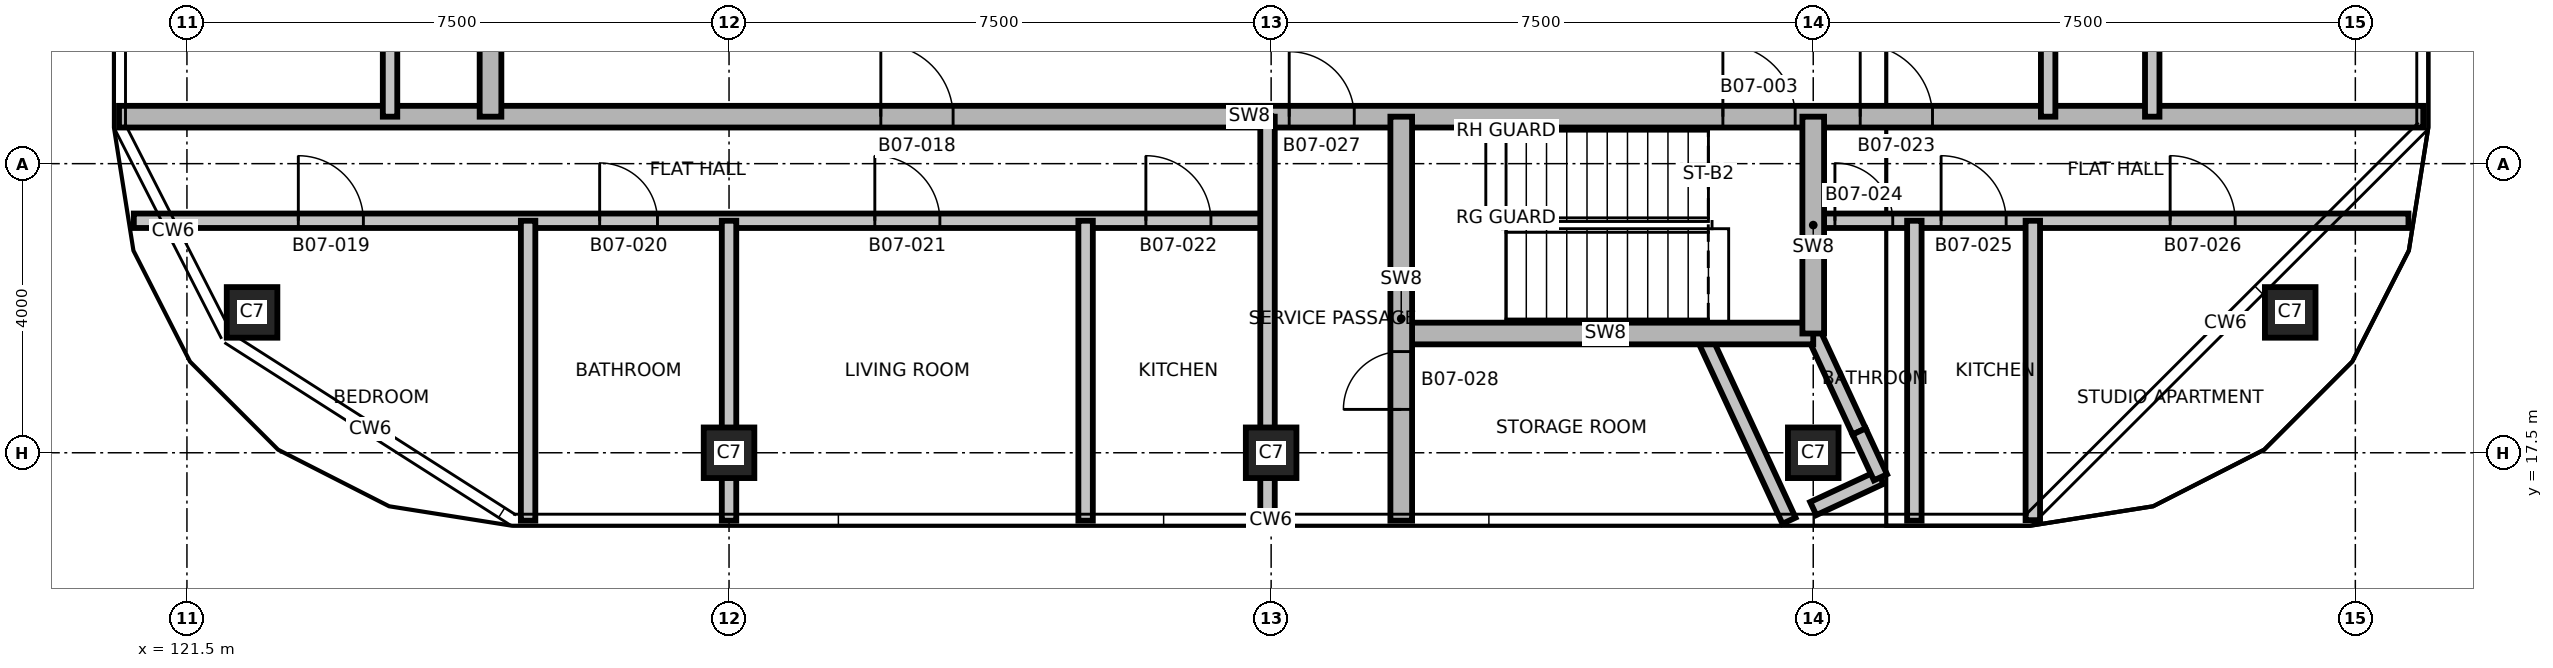
"""IFC4 building model, lengths in metres.
Left out: names, types, materials, properties, quantities, classifications, styles, units other than length and angle.
Written with IfcOpenShell. Run it as: python <this file> out.ifc"""

import sys

from ifc_helpers import new_model, si_unit, direction, frame, frame_2d, origin, origin_2d, place, context, subcontext, project, spatial, rectangle, extrude, element, fill, save


model = new_model("IFC4")
c1 = context("Model", 3, precision=1e-05, world=origin(), true_north=direction((0.0, 1.0)))
c2 = subcontext(c1, "Body", "Model", "MODEL_VIEW")
j1 = project(units=[si_unit("LENGTHUNIT", "METRE"), si_unit("PLANEANGLEUNIT", "RADIAN")], contexts=[c1])
p1 = place(None, origin())
s1 = spatial("IfcSite", under=j1, at=p1, CompositionType="ELEMENT")
p2 = place(p1, origin())
s2 = spatial("IfcBuilding", under=s1, at=p2, CompositionType="ELEMENT")
p3 = place(p2, frame((0.0, 0.0, 90.8)))
s3 = spatial("IfcBuildingStorey", under=s2, at=p3, CompositionType="ELEMENT", Elevation=90.8)
for number, where, z_axis, x_axis in (
    (1, (129.0, 17.5, 0.0), (0.0, 0.0, 1.0), (1.0, 0.0, 0.0)),
    (2, (136.5, 17.5, 0.0), (0.0, 0.0, 1.0), (1.0, 0.0, 0.0)),
    (3, (144.0, 17.5, 0.0), (0.0, 0.0, 1.0), (1.0, 0.0, 0.0)),
    (4, (122.401, 19.442, 0.0), (0.0, 0.0, 1.0), (1.0, 0.0, 0.0)),
    (5, (150.599, 19.442, 0.0), (0.0, 0.0, 1.0), (1.0, 0.0, 0.0)),
):
    element("IfcColumn", number, at=place(p3, frame(where, z_axis=z_axis, x_axis=x_axis)), inside=s3, PredefinedType="COLUMN", context=c2, shape_type="SweptSolid", body=[
        extrude(rectangle(XDim=0.7, YDim=0.7, at=origin_2d()), origin(), (0.0, 0.0, 1.0), 3.7),
    ])
p4 = place(p3, frame((142.463, 19.15, 0.0), z_axis=(0.0, 0.0, 1.0), x_axis=(0.421030913131, -0.90704628889, 0.0)))
e6 = element("IfcWall", 6, at=p4, inside=s3, PredefinedType="PARTITIONING", context=c2, shape_type="SweptSolid", body=[
    extrude(rectangle(XDim=2.855, YDim=0.2, at=frame_2d((1.428, 0.0))), origin(), (0.0, 0.0, 1.0), 3.4),
])
p5 = place(p3, frame((144.0, 16.728, 0.0), z_axis=(0.0, 0.0, 1.0), x_axis=(0.906960240365, 0.42121624185, 0.0)))
e7 = element("IfcWall", 7, at=p5, inside=s3, PredefinedType="PARTITIONING", context=c2, shape_type="SweptSolid", body=[
    extrude(rectangle(XDim=1.025, YDim=0.2, at=frame_2d((0.513, 0.0))), origin(), (0.0, 0.0, 1.0), 3.4),
])
p6 = place(p3, frame((144.0, 19.163, 0.0), z_axis=(0.0, 0.0, 1.0), x_axis=(0.420997169079, -0.907061951372, 0.0)))
e8 = element("IfcWall", 8, at=p6, inside=s3, PredefinedType="PARTITIONING", context=c2, shape_type="SweptSolid", body=[
    extrude(rectangle(XDim=1.508, YDim=0.2, at=frame_2d((0.754, 0.0))), origin(), (0.0, 0.0, 1.0), 3.4),
])
p7 = place(p3, frame((144.635, 17.795, 0.0), z_axis=(0.0, 0.0, 1.0), x_axis=(0.421223998033, -0.906956638148, 0.0)))
e9 = element("IfcWall", 9, at=p7, inside=s3, PredefinedType="PARTITIONING", context=c2, shape_type="SweptSolid", body=[
    extrude(rectangle(XDim=0.7, YDim=0.2, at=frame_2d((0.35, 0.0))), origin(), (0.0, 0.0, 1.0), 3.4),
])
p8 = place(p3, frame((138.25, 19.15, 0.0), z_axis=(0.0, 0.0, 1.0), x_axis=(1.0, 0.0, 0.0)))
e10 = element("IfcWall", 10, at=p8, inside=s3, PredefinedType="SHEAR", context=c2, shape_type="SweptSolid", body=[
    extrude(rectangle(XDim=5.75, YDim=0.3, at=frame_2d((2.875, 0.0))), origin(), (0.0, 0.0, 1.0), 3.4),
])
p9 = place(p3, frame((120.765, 20.71, 0.0), z_axis=(0.0, 0.0, 1.0), x_axis=(1.0, 0.0, 0.0)))
e11 = element("IfcWall", 11, at=p9, inside=s3, PredefinedType="PARTITIONING", context=c2, shape_type="SweptSolid", body=[
    extrude(rectangle(XDim=15.735, YDim=0.2, at=frame_2d((7.868, 0.0))), origin(), (0.0, 0.0, 1.0), 3.4),
])
p10 = place(p9, frame((2.276, 0.0, 0.0)))
e12 = element("IfcOpeningElement", 12, at=p10, cuts=e11, PredefinedType="OPENING", context=c2, shape_type="SweptSolid", body=[
    extrude(rectangle(XDim=0.9, YDim=2.1, at=frame_2d((0.45, 1.05))), frame((0.0, 0.11, 0.0), z_axis=(0.0, -1.0, 0.0), x_axis=(1.0, 0.0, 0.0)), (0.0, 0.0, 1.0), 0.22),
])
p11 = place(p9, frame((6.445, 0.0, 0.0)))
e13 = element("IfcOpeningElement", 13, at=p11, cuts=e11, PredefinedType="OPENING", context=c2, shape_type="SweptSolid", body=[
    extrude(rectangle(XDim=0.8, YDim=2.1, at=frame_2d((0.4, 1.05))), frame((0.0, 0.11, 0.0), z_axis=(0.0, -1.0, 0.0), x_axis=(1.0, 0.0, 0.0)), (0.0, 0.0, 1.0), 0.22),
])
p12 = place(p9, frame((10.252, 0.0, 0.0)))
e14 = element("IfcOpeningElement", 14, at=p12, cuts=e11, PredefinedType="OPENING", context=c2, shape_type="SweptSolid", body=[
    extrude(rectangle(XDim=0.9, YDim=2.1, at=frame_2d((0.45, 1.05))), frame((0.0, 0.11, 0.0), z_axis=(0.0, -1.0, 0.0), x_axis=(1.0, 0.0, 0.0)), (0.0, 0.0, 1.0), 0.22),
])
p13 = place(p9, frame((14.002, 0.0, 0.0)))
e15 = element("IfcOpeningElement", 15, at=p13, cuts=e11, PredefinedType="OPENING", context=c2, shape_type="SweptSolid", body=[
    extrude(rectangle(XDim=0.9, YDim=2.1, at=frame_2d((0.45, 1.05))), frame((0.0, 0.11, 0.0), z_axis=(0.0, -1.0, 0.0), x_axis=(1.0, 0.0, 0.0)), (0.0, 0.0, 1.0), 0.22),
])
p14 = place(p3, frame((144.0, 20.71, 0.0), z_axis=(0.0, 0.0, 1.0), x_axis=(1.0, 0.0, 0.0)))
e16 = element("IfcWall", 16, at=p14, inside=s3, PredefinedType="PARTITIONING", context=c2, shape_type="SweptSolid", body=[
    extrude(rectangle(XDim=8.235, YDim=0.2, at=frame_2d((4.118, 0.0))), origin(), (0.0, 0.0, 1.0), 3.4),
])
p15 = place(p14, frame((0.3, 0.0, 0.0)))
e17 = element("IfcOpeningElement", 17, at=p15, cuts=e16, PredefinedType="OPENING", context=c2, shape_type="SweptSolid", body=[
    extrude(rectangle(XDim=0.8, YDim=2.1, at=frame_2d((0.4, 1.05))), frame((0.0, 0.11, 0.0), z_axis=(0.0, -1.0, 0.0), x_axis=(1.0, 0.0, 0.0)), (0.0, 0.0, 1.0), 0.22),
])
p16 = place(p14, frame((1.769, 0.0, 0.0)))
e18 = element("IfcOpeningElement", 18, at=p16, cuts=e16, PredefinedType="OPENING", context=c2, shape_type="SweptSolid", body=[
    extrude(rectangle(XDim=0.9, YDim=2.1, at=frame_2d((0.45, 1.05))), frame((0.0, 0.11, 0.0), z_axis=(0.0, -1.0, 0.0), x_axis=(1.0, 0.0, 0.0)), (0.0, 0.0, 1.0), 0.22),
])
p17 = place(p14, frame((4.938, 0.0, 0.0)))
e19 = element("IfcOpeningElement", 19, at=p17, cuts=e16, PredefinedType="OPENING", context=c2, shape_type="SweptSolid", body=[
    extrude(rectangle(XDim=0.9, YDim=2.1, at=frame_2d((0.45, 1.05))), frame((0.0, 0.11, 0.0), z_axis=(0.0, -1.0, 0.0), x_axis=(1.0, 0.0, 0.0)), (0.0, 0.0, 1.0), 0.22),
])
p18 = place(p3, frame((120.56, 22.15, 0.0), z_axis=(0.0, 0.0, 1.0), x_axis=(1.0, 0.0, 0.0)))
e20 = element("IfcWall", 20, at=p18, inside=s3, PredefinedType="SHEAR", context=c2, shape_type="SweptSolid", body=[
    extrude(rectangle(XDim=31.88, YDim=0.3, at=frame_2d((15.94, 0.0))), origin(), (0.0, 0.0, 1.0), 3.4),
])
p19 = place(p18, frame((22.19, 0.0, 0.0)))
e21 = element("IfcOpeningElement", 21, at=p19, cuts=e20, PredefinedType="OPENING", context=c2, shape_type="SweptSolid", body=[
    extrude(rectangle(XDim=1.0, YDim=2.1, at=frame_2d((0.5, 1.05))), frame((0.0, 0.16, 0.0), z_axis=(0.0, -1.0, 0.0), x_axis=(1.0, 0.0, 0.0)), (0.0, 0.0, 1.0), 0.32),
])
p20 = place(p18, frame((10.54, 0.0, 0.0)))
e22 = element("IfcOpeningElement", 22, at=p20, cuts=e20, PredefinedType="OPENING", context=c2, shape_type="SweptSolid", body=[
    extrude(rectangle(XDim=1.0, YDim=2.1, at=frame_2d((0.5, 1.05))), frame((0.0, 0.16, 0.0), z_axis=(0.0, -1.0, 0.0), x_axis=(1.0, 0.0, 0.0)), (0.0, 0.0, 1.0), 0.32),
])
p21 = place(p18, frame((24.09, 0.0, 0.0)))
e23 = element("IfcOpeningElement", 23, at=p21, cuts=e20, PredefinedType="OPENING", context=c2, shape_type="SweptSolid", body=[
    extrude(rectangle(XDim=1.0, YDim=2.1, at=frame_2d((0.5, 1.05))), frame((0.0, 0.16, 0.0), z_axis=(0.0, -1.0, 0.0), x_axis=(1.0, 0.0, 0.0)), (0.0, 0.0, 1.0), 0.32),
])
p22 = place(p18, frame((16.19, 0.0, 0.0)))
e24 = element("IfcOpeningElement", 24, at=p22, cuts=e20, PredefinedType="OPENING", context=c2, shape_type="SweptSolid", body=[
    extrude(rectangle(XDim=0.9, YDim=2.1, at=frame_2d((0.45, 1.05))), frame((0.0, 0.16, 0.0), z_axis=(0.0, -1.0, 0.0), x_axis=(1.0, 0.0, 0.0)), (0.0, 0.0, 1.0), 0.32),
])
p23 = place(p3, frame((124.31, 22.15, 0.0), z_axis=(0.0, 0.0, 1.0), x_axis=(0.0, 1.0, 0.0)))
e25 = element("IfcWall", 25, at=p23, inside=s3, PredefinedType="PARTITIONING", context=c2, shape_type="SweptSolid", body=[
    extrude(rectangle(XDim=17.7, YDim=0.2, at=frame_2d((8.85, 0.0))), origin(), (0.0, 0.0, 1.0), 3.4),
])
p24 = place(p23, frame((1.725, 0.0, 0.0)))
e26 = element("IfcOpeningElement", 26, at=p24, cuts=e25, PredefinedType="OPENING", context=c2, shape_type="SweptSolid", body=[
    extrude(rectangle(XDim=0.9, YDim=2.1, at=frame_2d((0.45, 1.05))), frame((0.0, 0.11, 0.0), z_axis=(0.0, -1.0, 0.0), x_axis=(1.0, 0.0, 0.0)), (0.0, 0.0, 1.0), 0.22),
])
p25 = place(p23, frame((6.867, 0.0, 0.0)))
e27 = element("IfcOpeningElement", 27, at=p25, cuts=e25, PredefinedType="OPENING", context=c2, shape_type="SweptSolid", body=[
    extrude(rectangle(XDim=0.9, YDim=2.1, at=frame_2d((0.45, 1.05))), frame((0.0, 0.11, 0.0), z_axis=(0.0, -1.0, 0.0), x_axis=(1.0, 0.0, 0.0)), (0.0, 0.0, 1.0), 0.22),
])
p26 = place(p23, frame((11.367, 0.0, 0.0)))
e28 = element("IfcOpeningElement", 28, at=p26, cuts=e25, PredefinedType="OPENING", context=c2, shape_type="SweptSolid", body=[
    extrude(rectangle(XDim=0.9, YDim=2.1, at=frame_2d((0.45, 1.05))), frame((0.0, 0.11, 0.0), z_axis=(0.0, -1.0, 0.0), x_axis=(1.0, 0.0, 0.0)), (0.0, 0.0, 1.0), 0.22),
])
p27 = place(p23, frame((14.378, 0.0, 0.0)))
e29 = element("IfcOpeningElement", 29, at=p27, cuts=e25, PredefinedType="OPENING", context=c2, shape_type="SweptSolid", body=[
    extrude(rectangle(XDim=0.9, YDim=2.1, at=frame_2d((0.45, 1.05))), frame((0.0, 0.11, 0.0), z_axis=(0.0, -1.0, 0.0), x_axis=(1.0, 0.0, 0.0)), (0.0, 0.0, 1.0), 0.22),
])
p28 = place(p23, frame((16.603, 0.0, 0.0)))
e30 = element("IfcOpeningElement", 30, at=p28, cuts=e25, PredefinedType="OPENING", context=c2, shape_type="SweptSolid", body=[
    extrude(rectangle(XDim=0.8, YDim=2.1, at=frame_2d((0.4, 1.05))), frame((0.0, 0.11, 0.0), z_axis=(0.0, -1.0, 0.0), x_axis=(1.0, 0.0, 0.0)), (0.0, 0.0, 1.0), 0.22),
])
p29 = place(p3, frame((125.7, 22.15, 0.0), z_axis=(0.0, 0.0, 1.0), x_axis=(0.0, 1.0, 0.0)))
e31 = element("IfcWall", 31, at=p29, inside=s3, PredefinedType="SHEAR", context=c2, shape_type="SweptSolid", body=[
    extrude(rectangle(XDim=17.7, YDim=0.3, at=frame_2d((8.85, 0.0))), origin(), (0.0, 0.0, 1.0), 3.4),
])
p30 = place(p29, frame((2.7, 0.0, 0.0)))
e32 = element("IfcOpeningElement", 32, at=p30, cuts=e31, PredefinedType="OPENING", context=c2, shape_type="SweptSolid", body=[
    extrude(rectangle(XDim=1.0, YDim=2.1, at=frame_2d((0.5, 1.05))), frame((0.0, 0.16, 0.0), z_axis=(0.0, -1.0, 0.0), x_axis=(1.0, 0.0, 0.0)), (0.0, 0.0, 1.0), 0.32),
])
for number, where, z_axis, x_axis in (
    (33, (126.22, 16.56, 0.0), (0.0, 0.0, 1.0), (0.0, 1.0, 0.0)),
    (34, (129.0, 16.56, 0.0), (0.0, 0.0, 1.0), (0.0, 1.0, 0.0)),
    (35, (133.933, 16.56, 0.0), (0.0, 0.0, 1.0), (0.0, 1.0, 0.0)),
):
    element("IfcWall", number, at=place(p3, frame(where, z_axis=z_axis, x_axis=x_axis)), inside=s3, PredefinedType="PARTITIONING", context=c2, shape_type="SweptSolid", body=[
        extrude(rectangle(XDim=4.15, YDim=0.2, at=frame_2d((2.075, 0.0))), origin(), (0.0, 0.0, 1.0), 3.4),
    ])
p31 = place(p3, frame((136.45, 16.56, 0.0), z_axis=(0.0, 0.0, 1.0), x_axis=(0.0, 1.0, 0.0)))
e36 = element("IfcWall", 36, at=p31, inside=s3, PredefinedType="PARTITIONING", context=c2, shape_type="SweptSolid", body=[
    extrude(rectangle(XDim=5.59, YDim=0.2, at=frame_2d((2.795, 0.0))), origin(), (0.0, 0.0, 1.0), 3.4),
])
p32 = place(p3, frame((138.3, 16.56, 0.0), z_axis=(0.0, 0.0, 1.0), x_axis=(0.0, 1.0, 0.0)))
e37 = element("IfcWall", 37, at=p32, inside=s3, PredefinedType="SHEAR", context=c2, shape_type="SweptSolid", body=[
    extrude(rectangle(XDim=5.59, YDim=0.3, at=frame_2d((2.795, 0.0))), origin(), (0.0, 0.0, 1.0), 3.4),
])
p33 = place(p32, frame((1.54, 0.0, 0.0)))
e38 = element("IfcOpeningElement", 38, at=p33, cuts=e37, PredefinedType="OPENING", context=c2, shape_type="SweptSolid", body=[
    extrude(rectangle(XDim=0.8, YDim=2.1, at=frame_2d((0.4, 1.05))), frame((0.0, 0.16, 0.0), z_axis=(0.0, -1.0, 0.0), x_axis=(1.0, 0.0, 0.0)), (0.0, 0.0, 1.0), 0.32),
])
p34 = place(p3, frame((144.0, 19.15, 0.0), z_axis=(0.0, 0.0, 1.0), x_axis=(0.0, 1.0, 0.0)))
e39 = element("IfcWall", 39, at=p34, inside=s3, PredefinedType="SHEAR", context=c2, shape_type="SweptSolid", body=[
    extrude(rectangle(XDim=3.0, YDim=0.3, at=frame_2d((1.5, 0.0))), origin(), (0.0, 0.0, 1.0), 3.4),
])
p35 = place(p3, frame((145.399, 16.56, 0.0), z_axis=(0.0, 0.0, 1.0), x_axis=(0.0, 1.0, 0.0)))
e40 = element("IfcWall", 40, at=p35, inside=s3, PredefinedType="PARTITIONING", context=c2, shape_type="SweptSolid", body=[
    extrude(rectangle(XDim=4.15, YDim=0.2, at=frame_2d((2.075, 0.0))), origin(), (0.0, 0.0, 1.0), 3.4),
])
p36 = place(p3, frame((147.038, 16.567, 0.0), z_axis=(0.0, 0.0, 1.0), x_axis=(0.0, 1.0, 0.0)))
e41 = element("IfcWall", 41, at=p36, inside=s3, PredefinedType="PARTITIONING", context=c2, shape_type="SweptSolid", body=[
    extrude(rectangle(XDim=4.143, YDim=0.2, at=frame_2d((2.072, 0.0))), origin(), (0.0, 0.0, 1.0), 3.4),
])
p37 = place(p3, frame((147.25, 22.15, 0.0), z_axis=(0.0, 0.0, 1.0), x_axis=(0.0, 1.0, 0.0)))
e42 = element("IfcWall", 42, at=p37, inside=s3, PredefinedType="PARTITIONING", context=c2, shape_type="SweptSolid", body=[
    extrude(rectangle(XDim=17.7, YDim=0.2, at=frame_2d((8.85, 0.0))), origin(), (0.0, 0.0, 1.0), 3.4),
])
p38 = place(p37, frame((2.65, 0.0, 0.0)))
e43 = element("IfcOpeningElement", 43, at=p38, cuts=e42, PredefinedType="OPENING", context=c2, shape_type="SweptSolid", body=[
    extrude(rectangle(XDim=1.0, YDim=2.1, at=frame_2d((0.5, 1.05))), frame((0.0, 0.11, 0.0), z_axis=(0.0, -1.0, 0.0), x_axis=(1.0, 0.0, 0.0)), (0.0, 0.0, 1.0), 0.22),
])
p39 = place(p3, frame((148.69, 22.15, 0.0), z_axis=(0.0, 0.0, 1.0), x_axis=(0.0, 1.0, 0.0)))
e44 = element("IfcWall", 44, at=p39, inside=s3, PredefinedType="PARTITIONING", context=c2, shape_type="SweptSolid", body=[
    extrude(rectangle(XDim=17.7, YDim=0.2, at=frame_2d((8.85, 0.0))), origin(), (0.0, 0.0, 1.0), 3.4),
])
p40 = place(p39, frame((1.028, 0.0, 0.0)))
e45 = element("IfcOpeningElement", 45, at=p40, cuts=e44, PredefinedType="OPENING", context=c2, shape_type="SweptSolid", body=[
    extrude(rectangle(XDim=0.9, YDim=2.1, at=frame_2d((0.45, 1.05))), frame((0.0, 0.11, 0.0), z_axis=(0.0, -1.0, 0.0), x_axis=(1.0, 0.0, 0.0)), (0.0, 0.0, 1.0), 0.22),
])
p41 = place(p39, frame((3.253, 0.0, 0.0)))
e46 = element("IfcOpeningElement", 46, at=p41, cuts=e44, PredefinedType="OPENING", context=c2, shape_type="SweptSolid", body=[
    extrude(rectangle(XDim=0.8, YDim=2.1, at=frame_2d((0.4, 1.05))), frame((0.0, 0.11, 0.0), z_axis=(0.0, -1.0, 0.0), x_axis=(1.0, 0.0, 0.0)), (0.0, 0.0, 1.0), 0.22),
])
p42 = place(p39, frame((6.867, 0.0, 0.0)))
e47 = element("IfcOpeningElement", 47, at=p42, cuts=e44, PredefinedType="OPENING", context=c2, shape_type="SweptSolid", body=[
    extrude(rectangle(XDim=0.9, YDim=2.1, at=frame_2d((0.45, 1.05))), frame((0.0, 0.11, 0.0), z_axis=(0.0, -1.0, 0.0), x_axis=(1.0, 0.0, 0.0)), (0.0, 0.0, 1.0), 0.22),
])
p43 = place(p39, frame((11.367, 0.0, 0.0)))
e48 = element("IfcOpeningElement", 48, at=p43, cuts=e44, PredefinedType="OPENING", context=c2, shape_type="SweptSolid", body=[
    extrude(rectangle(XDim=0.9, YDim=2.1, at=frame_2d((0.45, 1.05))), frame((0.0, 0.11, 0.0), z_axis=(0.0, -1.0, 0.0), x_axis=(1.0, 0.0, 0.0)), (0.0, 0.0, 1.0), 0.22),
])
p44 = place(p39, frame((15.075, 0.0, 0.0)))
e49 = element("IfcOpeningElement", 49, at=p44, cuts=e44, PredefinedType="OPENING", context=c2, shape_type="SweptSolid", body=[
    extrude(rectangle(XDim=0.9, YDim=2.1, at=frame_2d((0.45, 1.05))), frame((0.0, 0.11, 0.0), z_axis=(0.0, -1.0, 0.0), x_axis=(1.0, 0.0, 0.0)), (0.0, 0.0, 1.0), 0.22),
])
p45 = place(p19, origin())
e50 = element("IfcDoor", 50, at=p45, inside=s3, OperationType="SINGLE_SWING_LEFT", PredefinedType="DOOR", context=c2, shape_type="SweptSolid", body=[
    extrude(rectangle(XDim=1.0, YDim=2.1, at=frame_2d((0.5, 1.05))), frame((0.0, 0.025, 0.0), z_axis=(0.0, -1.0, 0.0), x_axis=(1.0, 0.0, 0.0)), (0.0, 0.0, 1.0), 0.05),
])
fill(e21, e50)
p46 = place(p20, origin())
e51 = element("IfcDoor", 51, at=p46, inside=s3, OperationType="SINGLE_SWING_RIGHT", PredefinedType="DOOR", context=c2, shape_type="SweptSolid", body=[
    extrude(rectangle(XDim=1.0, YDim=2.1, at=frame_2d((0.5, 1.05))), frame((0.0, 0.025, 0.0), z_axis=(0.0, -1.0, 0.0), x_axis=(1.0, 0.0, 0.0)), (0.0, 0.0, 1.0), 0.05),
])
fill(e22, e51)
p47 = place(p10, origin())
e52 = element("IfcDoor", 52, at=p47, inside=s3, OperationType="SINGLE_SWING_LEFT", PredefinedType="DOOR", context=c2, shape_type="SweptSolid", body=[
    extrude(rectangle(XDim=0.9, YDim=2.1, at=frame_2d((0.45, 1.05))), frame((0.0, 0.025, 0.0), z_axis=(0.0, -1.0, 0.0), x_axis=(1.0, 0.0, 0.0)), (0.0, 0.0, 1.0), 0.05),
])
fill(e12, e52)
p48 = place(p11, origin())
e53 = element("IfcDoor", 53, at=p48, inside=s3, OperationType="SINGLE_SWING_RIGHT", PredefinedType="DOOR", context=c2, shape_type="SweptSolid", body=[
    extrude(rectangle(XDim=0.8, YDim=2.1, at=frame_2d((0.4, 1.05))), frame((0.0, 0.025, 0.0), z_axis=(0.0, -1.0, 0.0), x_axis=(1.0, 0.0, 0.0)), (0.0, 0.0, 1.0), 0.05),
])
fill(e13, e53)
p49 = place(p12, origin())
e54 = element("IfcDoor", 54, at=p49, inside=s3, OperationType="SINGLE_SWING_LEFT", PredefinedType="DOOR", context=c2, shape_type="SweptSolid", body=[
    extrude(rectangle(XDim=0.9, YDim=2.1, at=frame_2d((0.45, 1.05))), frame((0.0, 0.025, 0.0), z_axis=(0.0, -1.0, 0.0), x_axis=(1.0, 0.0, 0.0)), (0.0, 0.0, 1.0), 0.05),
])
fill(e14, e54)
p50 = place(p13, origin())
e55 = element("IfcDoor", 55, at=p50, inside=s3, OperationType="SINGLE_SWING_RIGHT", PredefinedType="DOOR", context=c2, shape_type="SweptSolid", body=[
    extrude(rectangle(XDim=0.9, YDim=2.1, at=frame_2d((0.45, 1.05))), frame((0.0, 0.025, 0.0), z_axis=(0.0, -1.0, 0.0), x_axis=(1.0, 0.0, 0.0)), (0.0, 0.0, 1.0), 0.05),
])
fill(e15, e55)
p51 = place(p21, origin())
e56 = element("IfcDoor", 56, at=p51, inside=s3, OperationType="SINGLE_SWING_LEFT", PredefinedType="DOOR", context=c2, shape_type="SweptSolid", body=[
    extrude(rectangle(XDim=1.0, YDim=2.1, at=frame_2d((0.5, 1.05))), frame((0.0, 0.025, 0.0), z_axis=(0.0, -1.0, 0.0), x_axis=(1.0, 0.0, 0.0)), (0.0, 0.0, 1.0), 0.05),
])
fill(e23, e56)
p52 = place(p15, origin())
e57 = element("IfcDoor", 57, at=p52, inside=s3, OperationType="SINGLE_SWING_RIGHT", PredefinedType="DOOR", context=c2, shape_type="SweptSolid", body=[
    extrude(rectangle(XDim=0.8, YDim=2.1, at=frame_2d((0.4, 1.05))), frame((0.0, 0.025, 0.0), z_axis=(0.0, -1.0, 0.0), x_axis=(1.0, 0.0, 0.0)), (0.0, 0.0, 1.0), 0.05),
])
fill(e17, e57)
p53 = place(p16, origin())
e58 = element("IfcDoor", 58, at=p53, inside=s3, OperationType="SINGLE_SWING_LEFT", PredefinedType="DOOR", context=c2, shape_type="SweptSolid", body=[
    extrude(rectangle(XDim=0.9, YDim=2.1, at=frame_2d((0.45, 1.05))), frame((0.0, 0.025, 0.0), z_axis=(0.0, -1.0, 0.0), x_axis=(1.0, 0.0, 0.0)), (0.0, 0.0, 1.0), 0.05),
])
fill(e18, e58)
p54 = place(p17, origin())
e59 = element("IfcDoor", 59, at=p54, inside=s3, OperationType="SINGLE_SWING_RIGHT", PredefinedType="DOOR", context=c2, shape_type="SweptSolid", body=[
    extrude(rectangle(XDim=0.9, YDim=2.1, at=frame_2d((0.45, 1.05))), frame((0.0, 0.025, 0.0), z_axis=(0.0, -1.0, 0.0), x_axis=(1.0, 0.0, 0.0)), (0.0, 0.0, 1.0), 0.05),
])
fill(e19, e59)
p55 = place(p22, origin())
e60 = element("IfcDoor", 60, at=p55, inside=s3, OperationType="SINGLE_SWING_LEFT", PredefinedType="DOOR", context=c2, shape_type="SweptSolid", body=[
    extrude(rectangle(XDim=0.9, YDim=2.1, at=frame_2d((0.45, 1.05))), frame((0.0, 0.025, 0.0), z_axis=(0.0, -1.0, 0.0), x_axis=(1.0, 0.0, 0.0)), (0.0, 0.0, 1.0), 0.05),
])
fill(e24, e60)
p56 = place(p33, origin())
e61 = element("IfcDoor", 61, at=p56, inside=s3, OperationType="SINGLE_SWING_RIGHT", PredefinedType="DOOR", context=c2, shape_type="SweptSolid", body=[
    extrude(rectangle(XDim=0.8, YDim=2.1, at=frame_2d((0.4, 1.05))), frame((0.0, 0.025, 0.0), z_axis=(0.0, -1.0, 0.0), x_axis=(1.0, 0.0, 0.0)), (0.0, 0.0, 1.0), 0.05),
])
fill(e38, e61)
save(model, sys.argv[1])
